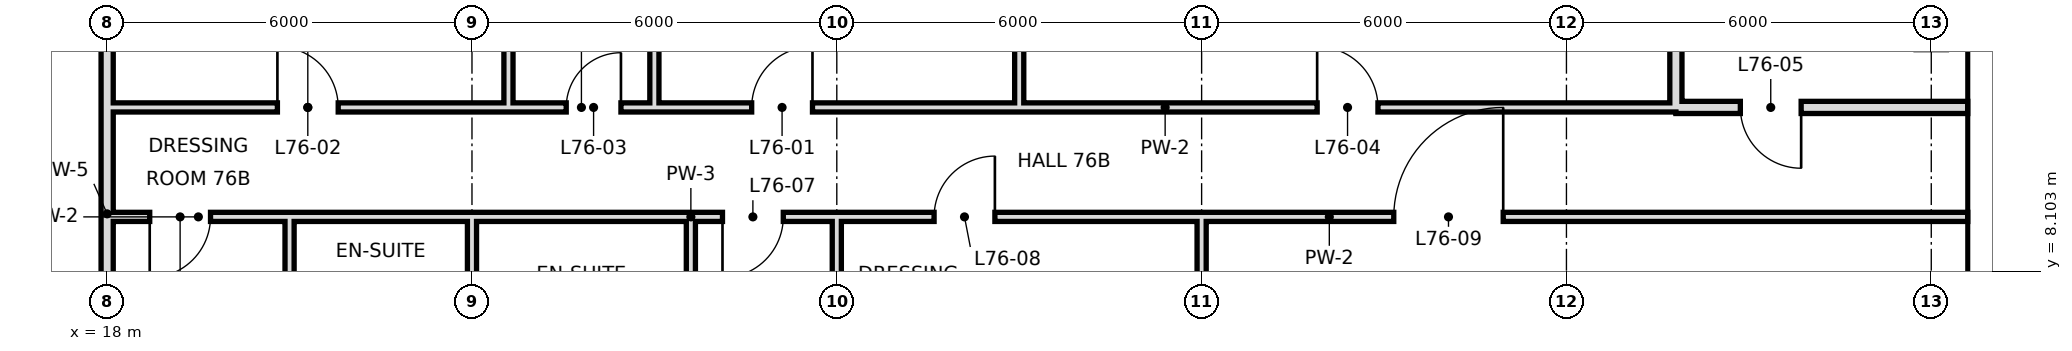
"""IFC4 building model, lengths in metres.
Left out: names, types, materials, properties, quantities, classifications, styles, units other than length and angle.
Written with IfcOpenShell. Run it as: python <this file> out.ifc"""

import sys

from ifc_helpers import new_model, si_unit, direction, frame, frame_2d, origin, place, context, subcontext, project, spatial, rectangle, extrude, element, fill, save


model = new_model("IFC4")
c1 = context("Model", 3, precision=1e-05, world=origin(), true_north=direction((0.0, 1.0)))
c2 = subcontext(c1, "Body", "Model", "MODEL_VIEW")
j1 = project(units=[si_unit("LENGTHUNIT", "METRE"), si_unit("PLANEANGLEUNIT", "RADIAN")], contexts=[c1])
p1 = place(None, origin())
s1 = spatial("IfcSite", under=j1, at=p1, CompositionType="ELEMENT")
p2 = place(p1, origin())
s2 = spatial("IfcBuilding", under=s1, at=p2, CompositionType="ELEMENT")
p3 = place(p2, frame((0.0, 0.0, 319.6)))
s3 = spatial("IfcBuildingStorey", under=s2, at=p3, CompositionType="ELEMENT", Elevation=319.6)
p4 = place(p3, frame((18.0, -0.6, 0.0), z_axis=(0.0, 0.0, 1.0), x_axis=(0.0, 1.0, 0.0)))
e1 = element("IfcWall", 1, at=p4, inside=s3, PredefinedType="SOLIDWALL", context=c2, shape_type="SweptSolid", body=[
    extrude(rectangle(XDim=19.3, YDim=0.2, at=frame_2d((9.65, 0.0))), origin(), (0.0, 0.0, 1.0), 2.72),
])
p5 = place(p3, frame((21.0, 6.0, 0.0), z_axis=(0.0, 0.0, 1.0), x_axis=(0.0, 1.0, 0.0)))
e2 = element("IfcWall", 2, at=p5, inside=s3, PredefinedType="PARTITIONING", context=c2, shape_type="SweptSolid", body=[
    extrude(rectangle(XDim=3.0, YDim=0.15, at=frame_2d((1.5, 0.0))), origin(), (0.0, 0.0, 1.0), 3.42),
])
p6 = place(p3, frame((24.0, 6.0, 0.0), z_axis=(0.0, 0.0, 1.0), x_axis=(0.0, 1.0, 0.0)))
e3 = element("IfcWall", 3, at=p6, inside=s3, PredefinedType="PARTITIONING", context=c2, shape_type="SweptSolid", body=[
    extrude(rectangle(XDim=3.0, YDim=0.15, at=frame_2d((1.5, 0.0))), origin(), (0.0, 0.0, 1.0), 2.72),
])
for number, where, z_axis, x_axis in (
    (4, (24.6, 10.8, 0.0), (0.0, 0.0, 1.0), (0.0, 1.0, 0.0)),
    (5, (27.0, 10.8, 0.0), (0.0, 0.0, 1.0), (0.0, 1.0, 0.0)),
):
    element("IfcWall", number, at=place(p3, frame(where, z_axis=z_axis, x_axis=x_axis)), inside=s3, PredefinedType="PARTITIONING", context=c2, shape_type="SweptSolid", body=[
        extrude(rectangle(XDim=7.9, YDim=0.15, at=frame_2d((3.95, 0.0))), origin(), (0.0, 0.0, 1.0), 3.42),
    ])
p7 = place(p3, frame((27.6, 6.0, 0.0), z_axis=(0.0, 0.0, 1.0), x_axis=(0.0, 1.0, 0.0)))
e6 = element("IfcWall", 6, at=p7, inside=s3, PredefinedType="PARTITIONING", context=c2, shape_type="SweptSolid", body=[
    extrude(rectangle(XDim=3.0, YDim=0.15, at=frame_2d((1.5, 0.0))), origin(), (0.0, 0.0, 1.0), 3.42),
])
p8 = place(p3, frame((30.0, -0.6, 0.0), z_axis=(0.0, 0.0, 1.0), x_axis=(0.0, 1.0, 0.0)))
e7 = element("IfcWall", 7, at=p8, inside=s3, PredefinedType="PARTITIONING", context=c2, shape_type="SweptSolid", body=[
    extrude(rectangle(XDim=9.6, YDim=0.15, at=frame_2d((4.8, 0.0))), origin(), (0.0, 0.0, 1.0), 2.72),
])
p9 = place(p3, frame((33.0, 10.8, 0.0), z_axis=(0.0, 0.0, 1.0), x_axis=(0.0, 1.0, 0.0)))
e8 = element("IfcWall", 8, at=p9, inside=s3, PredefinedType="PARTITIONING", context=c2, shape_type="SweptSolid", body=[
    extrude(rectangle(XDim=7.9, YDim=0.15, at=frame_2d((3.95, 0.0))), origin(), (0.0, 0.0, 1.0), 3.42),
])
p10 = place(p3, frame((36.0, 0.0, 0.0), z_axis=(0.0, 0.0, 1.0), x_axis=(0.0, 1.0, 0.0)))
e9 = element("IfcWall", 9, at=p10, inside=s3, PredefinedType="PARTITIONING", context=c2, shape_type="SweptSolid", body=[
    extrude(rectangle(XDim=9.0, YDim=0.15, at=frame_2d((4.5, 0.0))), origin(), (0.0, 0.0, 1.0), 2.72),
])
p11 = place(p3, frame((43.8, 10.8, 0.0), z_axis=(0.0, 0.0, 1.0), x_axis=(0.0, 1.0, 0.0)))
e10 = element("IfcWall", 10, at=p11, inside=s3, PredefinedType="SOLIDWALL", context=c2, shape_type="SweptSolid", body=[
    extrude(rectangle(XDim=7.9, YDim=0.2, at=frame_2d((3.95, 0.0))), origin(), (0.0, 0.0, 1.0), 2.72),
])
p12 = place(p3, frame((43.8, 10.8, 0.0), z_axis=(0.0, 0.0, 1.0), x_axis=(1.0, 0.0, 0.0)))
e11 = element("IfcWall", 11, at=p12, inside=s3, PredefinedType="SOLIDWALL", context=c2, shape_type="SweptSolid", body=[
    extrude(rectangle(XDim=4.8, YDim=0.2, at=frame_2d((2.4, 0.0))), origin(), (0.0, 0.0, 1.0), 2.97),
])
p13 = place(p12, frame((1.06, 0.0, 0.0)))
e12 = element("IfcOpeningElement", 12, at=p13, cuts=e11, PredefinedType="OPENING", context=c2, shape_type="SweptSolid", body=[
    extrude(rectangle(XDim=1.0, YDim=2.4, at=frame_2d((0.5, 1.2))), frame((0.0, 0.11, 0.0), z_axis=(0.0, -1.0, 0.0), x_axis=(1.0, 0.0, 0.0)), (0.0, 0.0, 1.0), 0.22),
])
p14 = place(p3, frame((18.0, 10.8, 0.0), z_axis=(0.0, 0.0, 1.0), x_axis=(1.0, 0.0, 0.0)))
e13 = element("IfcWall", 13, at=p14, inside=s3, PredefinedType="PARTITIONING", context=c2, shape_type="SweptSolid", body=[
    extrude(rectangle(XDim=6.6, YDim=0.15, at=frame_2d((3.3, 0.0))), origin(), (0.0, 0.0, 1.0), 3.42),
])
p15 = place(p14, frame((2.8, 0.0, 0.0)))
e14 = element("IfcOpeningElement", 14, at=p15, cuts=e13, PredefinedType="OPENING", context=c2, shape_type="SweptSolid", body=[
    extrude(rectangle(XDim=1.0, YDim=2.4, at=frame_2d((0.5, 1.2))), frame((0.0, 0.085, 0.0), z_axis=(0.0, -1.0, 0.0), x_axis=(1.0, 0.0, 0.0)), (0.0, 0.0, 1.0), 0.17),
])
p16 = place(p3, frame((27.0, 10.8, 0.0), z_axis=(0.0, 0.0, 1.0), x_axis=(1.0, 0.0, 0.0)))
e15 = element("IfcWall", 15, at=p16, inside=s3, PredefinedType="PARTITIONING", context=c2, shape_type="SweptSolid", body=[
    extrude(rectangle(XDim=16.8, YDim=0.15, at=frame_2d((8.4, 0.0))), origin(), (0.0, 0.0, 1.0), 3.42),
])
p17 = place(p16, frame((1.6, 0.0, 0.0)))
e16 = element("IfcOpeningElement", 16, at=p17, cuts=e15, PredefinedType="OPENING", context=c2, shape_type="SweptSolid", body=[
    extrude(rectangle(XDim=1.0, YDim=2.4, at=frame_2d((0.5, 1.2))), frame((0.0, 0.085, 0.0), z_axis=(0.0, -1.0, 0.0), x_axis=(1.0, 0.0, 0.0)), (0.0, 0.0, 1.0), 0.17),
])
p18 = place(p16, frame((10.9, 0.0, 0.0)))
e17 = element("IfcOpeningElement", 17, at=p18, cuts=e15, PredefinedType="OPENING", context=c2, shape_type="SweptSolid", body=[
    extrude(rectangle(XDim=1.0, YDim=2.4, at=frame_2d((0.5, 1.2))), frame((0.0, 0.085, 0.0), z_axis=(0.0, -1.0, 0.0), x_axis=(1.0, 0.0, 0.0)), (0.0, 0.0, 1.0), 0.17),
])
p19 = place(p3, frame((24.6, 10.8, 0.0), z_axis=(0.0, 0.0, 1.0), x_axis=(1.0, 0.0, 0.0)))
e18 = element("IfcWall", 18, at=p19, inside=s3, PredefinedType="PARTITIONING", context=c2, shape_type="SweptSolid", body=[
    extrude(rectangle(XDim=2.4, YDim=0.15, at=frame_2d((1.2, 0.0))), origin(), (0.0, 0.0, 1.0), 3.42),
])
p20 = place(p19, frame((0.95, 0.0, 0.0)))
e19 = element("IfcOpeningElement", 19, at=p20, cuts=e18, PredefinedType="OPENING", context=c2, shape_type="SweptSolid", body=[
    extrude(rectangle(XDim=0.9, YDim=2.4, at=frame_2d((0.45, 1.2))), frame((0.0, 0.085, 0.0), z_axis=(0.0, -1.0, 0.0), x_axis=(1.0, 0.0, 0.0)), (0.0, 0.0, 1.0), 0.17),
])
p21 = place(p3, frame((18.0, 9.0, 0.0), z_axis=(0.0, 0.0, 1.0), x_axis=(1.0, 0.0, 0.0)))
e20 = element("IfcWall", 20, at=p21, inside=s3, PredefinedType="PARTITIONING", context=c2, shape_type="SweptSolid", body=[
    extrude(rectangle(XDim=3.0, YDim=0.15, at=frame_2d((1.5, 0.0))), origin(), (0.0, 0.0, 1.0), 3.42),
])
p22 = place(p21, frame((0.7, 0.0, 0.0)))
e21 = element("IfcOpeningElement", 21, at=p22, cuts=e20, PredefinedType="OPENING", context=c2, shape_type="SweptSolid", body=[
    extrude(rectangle(XDim=1.0, YDim=2.4, at=frame_2d((0.5, 1.2))), frame((0.0, 0.085, 0.0), z_axis=(0.0, -1.0, 0.0), x_axis=(1.0, 0.0, 0.0)), (0.0, 0.0, 1.0), 0.17),
])
p23 = place(p3, frame((27.6, 9.0, 0.0), z_axis=(0.0, 0.0, 1.0), x_axis=(1.0, 0.0, 0.0)))
e22 = element("IfcWall", 22, at=p23, inside=s3, PredefinedType="PARTITIONING", context=c2, shape_type="SweptSolid", body=[
    extrude(rectangle(XDim=21.0, YDim=0.15, at=frame_2d((10.5, 0.0))), origin(), (0.0, 0.0, 1.0), 3.42),
])
p24 = place(p23, frame((0.52, 0.0, 0.0)))
e23 = element("IfcOpeningElement", 23, at=p24, cuts=e22, PredefinedType="OPENING", context=c2, shape_type="SweptSolid", body=[
    extrude(rectangle(XDim=1.0, YDim=2.4, at=frame_2d((0.5, 1.2))), frame((0.0, 0.085, 0.0), z_axis=(0.0, -1.0, 0.0), x_axis=(1.0, 0.0, 0.0)), (0.0, 0.0, 1.0), 0.17),
])
p25 = place(p23, frame((4.0, 0.0, 0.0)))
e24 = element("IfcOpeningElement", 24, at=p25, cuts=e22, PredefinedType="OPENING", context=c2, shape_type="SweptSolid", body=[
    extrude(rectangle(XDim=1.0, YDim=2.4, at=frame_2d((0.5, 1.2))), frame((0.0, 0.085, 0.0), z_axis=(0.0, -1.0, 0.0), x_axis=(1.0, 0.0, 0.0)), (0.0, 0.0, 1.0), 0.17),
])
p26 = place(p23, frame((11.56, 0.0, 0.0)))
e25 = element("IfcOpeningElement", 25, at=p26, cuts=e22, PredefinedType="OPENING", context=c2, shape_type="SweptSolid", body=[
    extrude(rectangle(XDim=1.8, YDim=2.4, at=frame_2d((0.9, 1.2))), frame((0.0, 0.085, 0.0), z_axis=(0.0, -1.0, 0.0), x_axis=(1.0, 0.0, 0.0)), (0.0, 0.0, 1.0), 0.17),
])
p27 = place(p3, frame((21.0, 9.0, 0.0), z_axis=(0.0, 0.0, 1.0), x_axis=(1.0, 0.0, 0.0)))
e26 = element("IfcWall", 26, at=p27, inside=s3, PredefinedType="PARTITIONING", context=c2, shape_type="SweptSolid", body=[
    extrude(rectangle(XDim=6.6, YDim=0.15, at=frame_2d((3.3, 0.0))), origin(), (0.0, 0.0, 1.0), 3.42),
])
p28 = place(p17, frame((1.0, 0.0, 0.0), z_axis=(0.0, 0.0, 1.0), x_axis=(-1.0, 0.0, 0.0)))
e27 = element("IfcDoor", 27, at=p28, inside=s3, OperationType="SINGLE_SWING_LEFT", PredefinedType="DOOR", context=c2, shape_type="SweptSolid", body=[
    extrude(rectangle(XDim=1.0, YDim=2.4, at=frame_2d((0.5, 1.2))), frame((0.0, 0.025, 0.0), z_axis=(0.0, -1.0, 0.0), x_axis=(1.0, 0.0, 0.0)), (0.0, 0.0, 1.0), 0.05),
])
fill(e16, e27)
p29 = place(p15, origin())
e28 = element("IfcDoor", 28, at=p29, inside=s3, OperationType="SINGLE_SWING_LEFT", PredefinedType="DOOR", context=c2, shape_type="SweptSolid", body=[
    extrude(rectangle(XDim=1.0, YDim=2.4, at=frame_2d((0.5, 1.2))), frame((0.0, 0.025, 0.0), z_axis=(0.0, -1.0, 0.0), x_axis=(1.0, 0.0, 0.0)), (0.0, 0.0, 1.0), 0.05),
])
fill(e14, e28)
p30 = place(p20, frame((0.9, 0.0, 0.0), z_axis=(0.0, 0.0, 1.0), x_axis=(-1.0, 0.0, 0.0)))
e29 = element("IfcDoor", 29, at=p30, inside=s3, OperationType="SINGLE_SWING_LEFT", PredefinedType="DOOR", context=c2, shape_type="SweptSolid", body=[
    extrude(rectangle(XDim=0.9, YDim=2.4, at=frame_2d((0.45, 1.2))), frame((0.0, 0.025, 0.0), z_axis=(0.0, -1.0, 0.0), x_axis=(1.0, 0.0, 0.0)), (0.0, 0.0, 1.0), 0.05),
])
fill(e19, e29)
p31 = place(p18, origin())
e30 = element("IfcDoor", 30, at=p31, inside=s3, OperationType="SINGLE_SWING_LEFT", PredefinedType="DOOR", context=c2, shape_type="SweptSolid", body=[
    extrude(rectangle(XDim=1.0, YDim=2.4, at=frame_2d((0.5, 1.2))), frame((0.0, 0.025, 0.0), z_axis=(0.0, -1.0, 0.0), x_axis=(1.0, 0.0, 0.0)), (0.0, 0.0, 1.0), 0.05),
])
fill(e17, e30)
p32 = place(p13, origin())
e31 = element("IfcDoor", 31, at=p32, inside=s3, OperationType="SINGLE_SWING_RIGHT", PredefinedType="DOOR", context=c2, shape_type="SweptSolid", body=[
    extrude(rectangle(XDim=1.0, YDim=2.4, at=frame_2d((0.5, 1.2))), frame((0.0, 0.025, 0.0), z_axis=(0.0, -1.0, 0.0), x_axis=(1.0, 0.0, 0.0)), (0.0, 0.0, 1.0), 0.05),
])
fill(e12, e31)
p33 = place(p22, frame((1.0, 0.0, 0.0), z_axis=(0.0, 0.0, 1.0), x_axis=(-1.0, 0.0, 0.0)))
e32 = element("IfcDoor", 32, at=p33, inside=s3, OperationType="SINGLE_SWING_RIGHT", PredefinedType="DOOR", context=c2, shape_type="SweptSolid", body=[
    extrude(rectangle(XDim=1.0, YDim=2.4, at=frame_2d((0.5, 1.2))), frame((0.0, 0.025, 0.0), z_axis=(0.0, -1.0, 0.0), x_axis=(1.0, 0.0, 0.0)), (0.0, 0.0, 1.0), 0.05),
])
fill(e21, e32)
p34 = place(p24, frame((1.0, 0.0, 0.0), z_axis=(0.0, 0.0, 1.0), x_axis=(-1.0, 0.0, 0.0)))
e33 = element("IfcDoor", 33, at=p34, inside=s3, OperationType="SINGLE_SWING_RIGHT", PredefinedType="DOOR", context=c2, shape_type="SweptSolid", body=[
    extrude(rectangle(XDim=1.0, YDim=2.4, at=frame_2d((0.5, 1.2))), frame((0.0, 0.025, 0.0), z_axis=(0.0, -1.0, 0.0), x_axis=(1.0, 0.0, 0.0)), (0.0, 0.0, 1.0), 0.05),
])
fill(e23, e33)
p35 = place(p25, frame((1.0, 0.0, 0.0), z_axis=(0.0, 0.0, 1.0), x_axis=(-1.0, 0.0, 0.0)))
e34 = element("IfcDoor", 34, at=p35, inside=s3, OperationType="SINGLE_SWING_LEFT", PredefinedType="DOOR", context=c2, shape_type="SweptSolid", body=[
    extrude(rectangle(XDim=1.0, YDim=2.4, at=frame_2d((0.5, 1.2))), frame((0.0, 0.025, 0.0), z_axis=(0.0, -1.0, 0.0), x_axis=(1.0, 0.0, 0.0)), (0.0, 0.0, 1.0), 0.05),
])
fill(e24, e34)
p36 = place(p26, frame((1.8, 0.0, 0.0), z_axis=(0.0, 0.0, 1.0), x_axis=(-1.0, 0.0, 0.0)))
e35 = element("IfcDoor", 35, at=p36, inside=s3, OperationType="SINGLE_SWING_LEFT", PredefinedType="DOOR", context=c2, shape_type="SweptSolid", body=[
    extrude(rectangle(XDim=1.8, YDim=2.4, at=frame_2d((0.9, 1.2))), frame((0.0, 0.025, 0.0), z_axis=(0.0, -1.0, 0.0), x_axis=(1.0, 0.0, 0.0)), (0.0, 0.0, 1.0), 0.05),
])
fill(e25, e35)
save(model, sys.argv[1])
